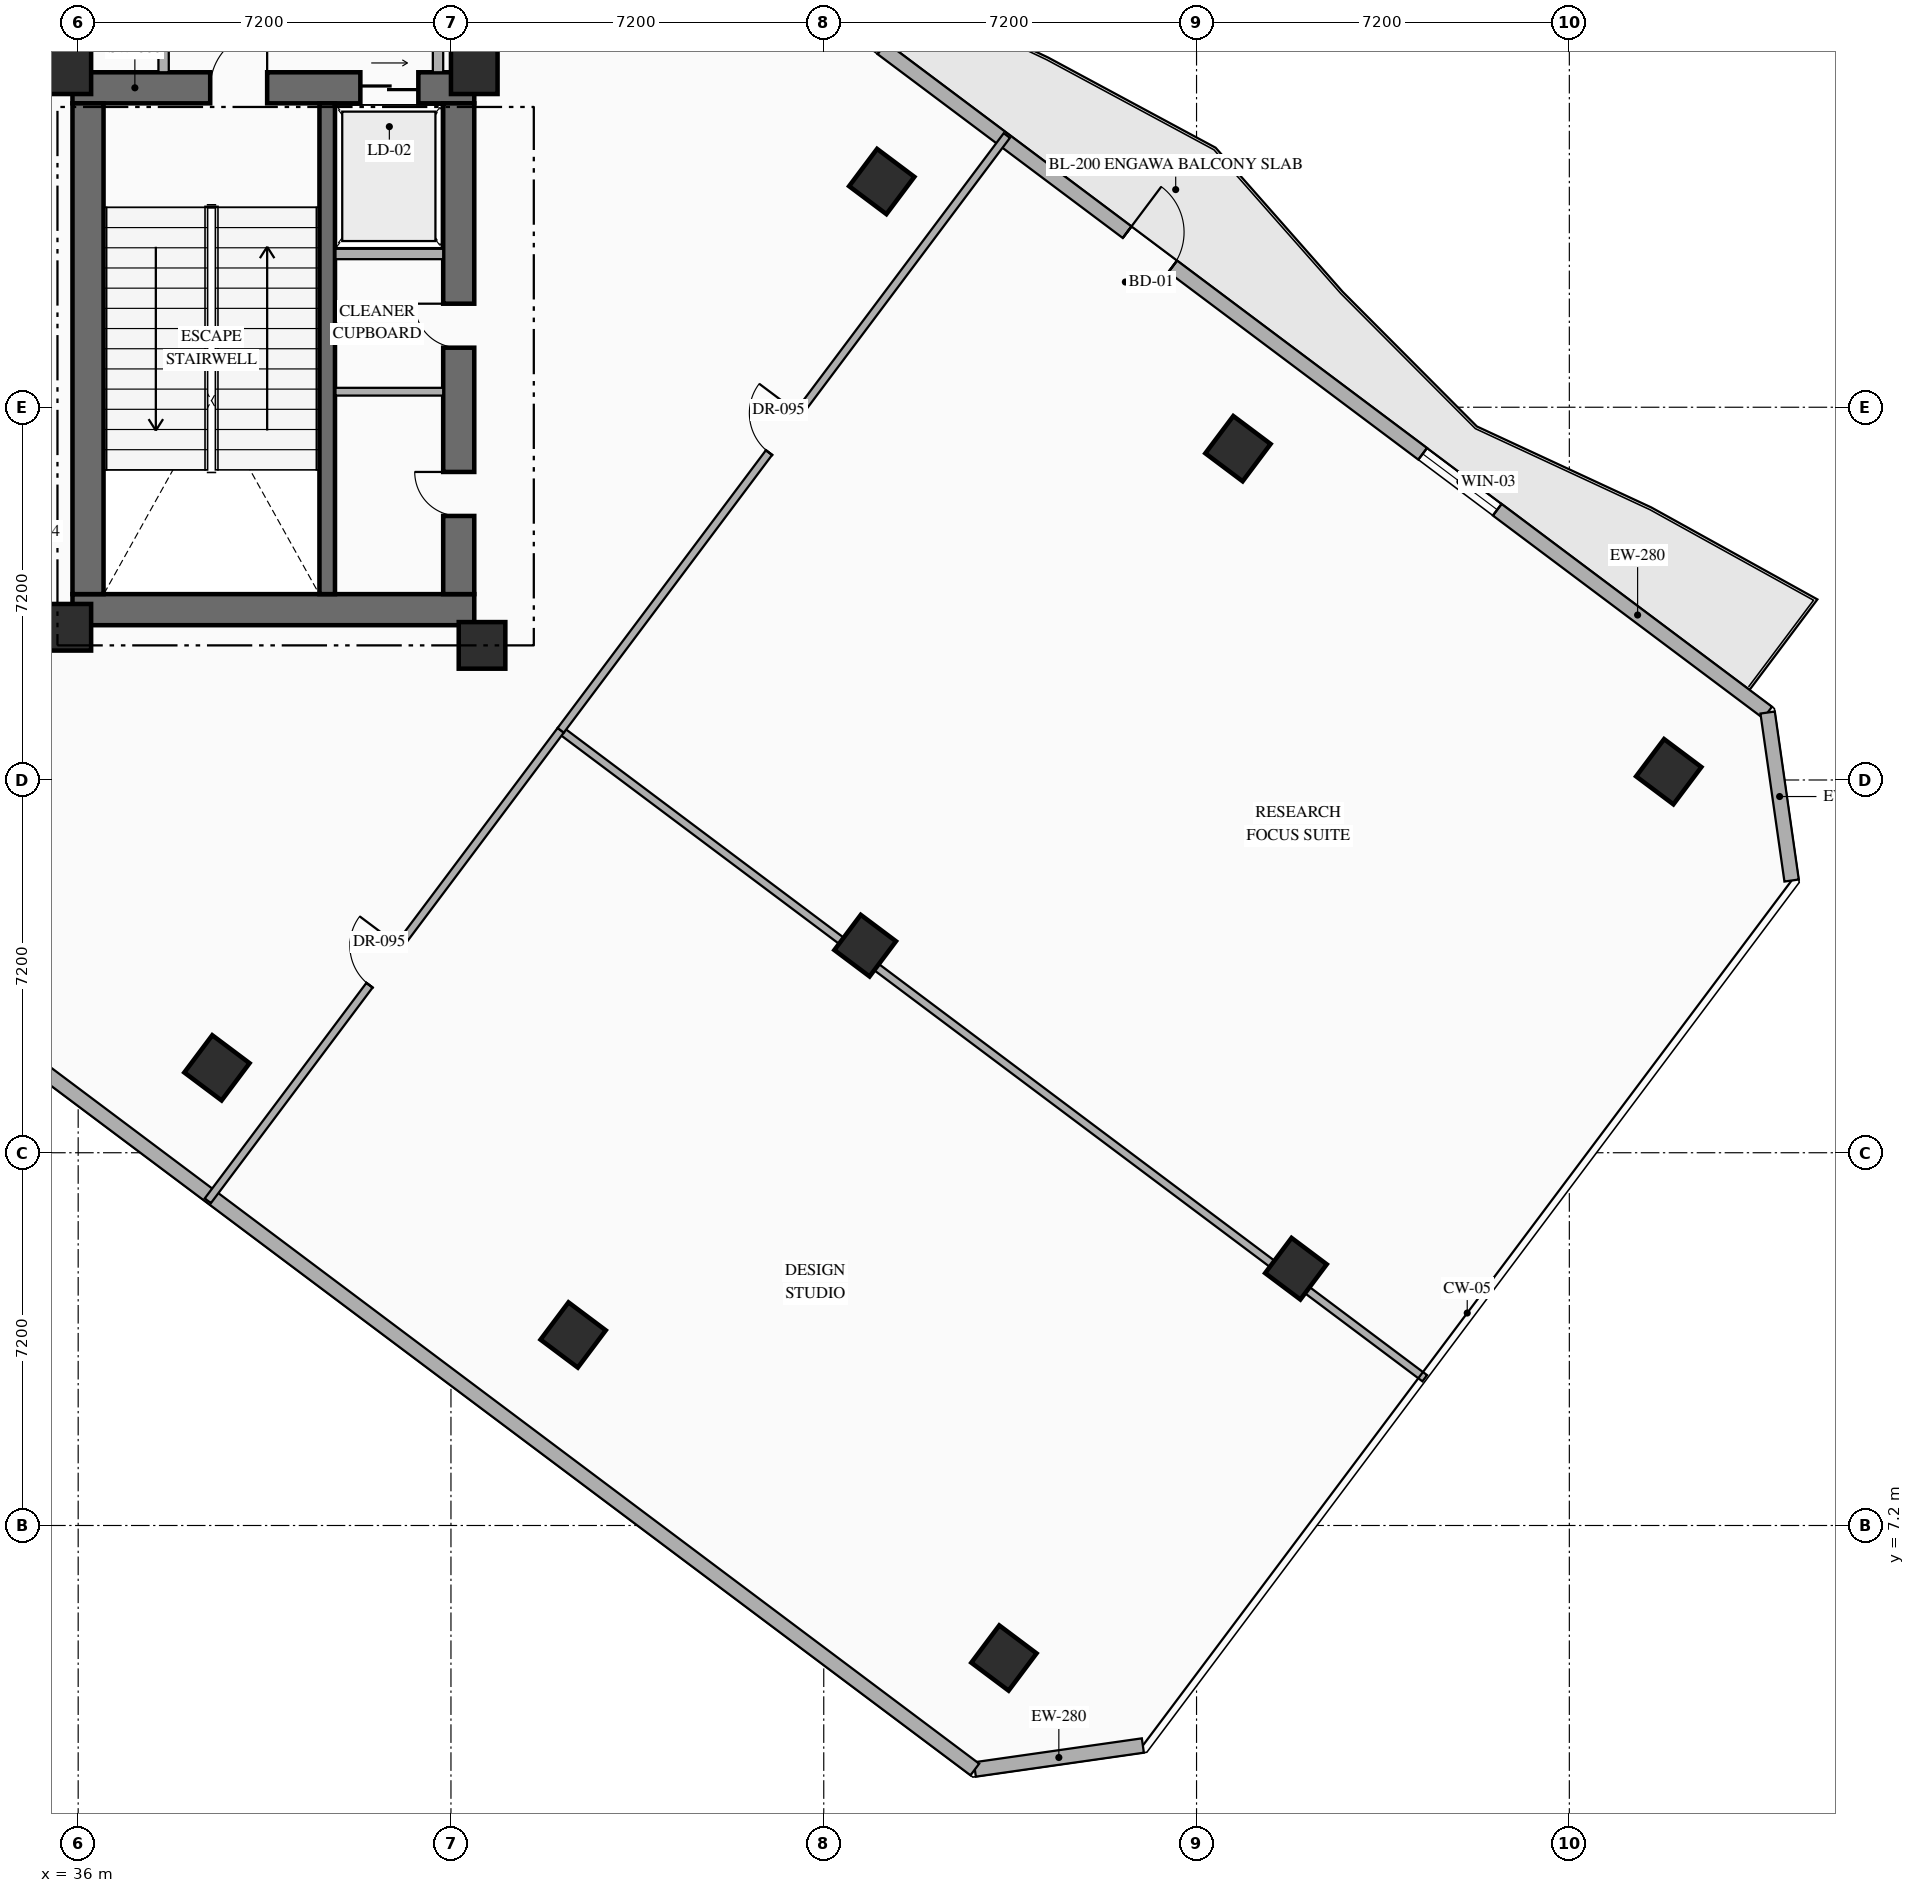
"""IFC4 building model, lengths in metres.
Left out: names, types, materials, properties, quantities, classifications, styles, units other than length and angle.
Written with IfcOpenShell. Run it as: python <this file> out.ifc"""

import sys

from ifc_helpers import new_model, si_unit, direction, frame, frame_2d, origin, origin_2d, place, context, subcontext, project, spatial, rectangle, hollow_rectangle, extrude, element, fill, save


model = new_model("IFC4")
c1 = context("Model", 3, precision=1e-05, world=origin(), true_north=direction((0.0, 1.0)))
c2 = subcontext(c1, "Body", "Model", "MODEL_VIEW")
j1 = project(units=[si_unit("LENGTHUNIT", "METRE"), si_unit("PLANEANGLEUNIT", "RADIAN")], contexts=[c1])
p1 = place(None, origin())
s1 = spatial("IfcSite", under=j1, at=p1, CompositionType="ELEMENT")
p2 = place(p1, origin())
s2 = spatial("IfcBuilding", under=s1, at=p2, CompositionType="ELEMENT")
p3 = place(p2, frame((0.0, 0.0, 96.45)))
s3 = spatial("IfcBuildingStorey", under=s2, at=p3, CompositionType="ELEMENT", Elevation=96.45)
p4 = place(p3, frame((35.89, 24.89, 0.0), z_axis=(0.0, 0.0, 1.0), x_axis=(1.0, 0.0, 0.0)))
e1 = element("IfcWall", 1, at=p4, inside=s3, PredefinedType="SHEAR", context=c2, shape_type="SweptSolid", body=[
    extrude(rectangle(XDim=7.76, YDim=0.6, at=frame_2d((3.88, 0.0))), origin(), (0.0, 0.0, 1.0), 4.8),
])
p5 = place(p3, frame((35.89, 34.97, 0.0), z_axis=(0.0, 0.0, 1.0), x_axis=(1.0, 0.0, 0.0)))
e2 = element("IfcWall", 2, at=p5, inside=s3, PredefinedType="SHEAR", context=c2, shape_type="SweptSolid", body=[
    extrude(rectangle(XDim=7.76, YDim=0.6, at=frame_2d((3.88, 0.0))), origin(), (0.0, 0.0, 1.0), 4.8),
])
p6 = place(p5, frame((2.66, 0.0, 0.0)))
e3 = element("IfcOpeningElement", 3, at=p6, cuts=e2, PredefinedType="OPENING", context=c2, shape_type="SweptSolid", body=[
    extrude(rectangle(XDim=1.1, YDim=2.2, at=frame_2d((0.55, 1.1))), frame((0.0, 0.31, 0.0), z_axis=(0.0, -1.0, 0.0), x_axis=(1.0, 0.0, 0.0)), (0.0, 0.0, 1.0), 0.62),
])
p7 = place(p5, frame((5.56, 0.0, 0.0)))
e4 = element("IfcOpeningElement", 4, at=p7, cuts=e2, PredefinedType="OPENING", context=c2, shape_type="SweptSolid", body=[
    extrude(rectangle(XDim=1.12, YDim=2.15, at=frame_2d((0.56, 1.075))), frame((0.0, 0.31, 0.0), z_axis=(0.0, -1.0, 0.0), x_axis=(1.0, 0.0, 0.0)), (0.0, 0.0, 1.0), 0.62),
])
p8 = place(p3, frame((36.19, 25.19, 0.0), z_axis=(0.0, 0.0, 1.0), x_axis=(0.0, 1.0, 0.0)))
e5 = element("IfcWall", 5, at=p8, inside=s3, PredefinedType="SHEAR", context=c2, shape_type="SweptSolid", body=[
    extrude(rectangle(XDim=9.48, YDim=0.6, at=frame_2d((4.74, 0.0))), origin(), (0.0, 0.0, 1.0), 4.8),
])
p9 = place(p3, frame((43.35, 25.19, 0.0), z_axis=(0.0, 0.0, 1.0), x_axis=(0.0, 1.0, 0.0)))
e6 = element("IfcWall", 6, at=p9, inside=s3, PredefinedType="SHEAR", context=c2, shape_type="SweptSolid", body=[
    extrude(rectangle(XDim=9.48, YDim=0.6, at=frame_2d((4.74, 0.0))), origin(), (0.0, 0.0, 1.0), 4.8),
])
p10 = place(p9, frame((1.51, 0.0, 0.0)))
e7 = element("IfcOpeningElement", 7, at=p10, cuts=e6, PredefinedType="OPENING", context=c2, shape_type="SweptSolid", body=[
    extrude(rectangle(XDim=0.85, YDim=2.08, at=frame_2d((0.425, 1.04))), frame((0.0, 0.31, 0.0), z_axis=(0.0, -1.0, 0.0), x_axis=(1.0, 0.0, 0.0)), (0.0, 0.0, 1.0), 0.62),
])
p11 = place(p9, frame((4.76, 0.0, 0.0)))
e8 = element("IfcOpeningElement", 8, at=p11, cuts=e6, PredefinedType="OPENING", context=c2, shape_type="SweptSolid", body=[
    extrude(rectangle(XDim=0.85, YDim=2.08, at=frame_2d((0.425, 1.04))), frame((0.0, 0.31, 0.0), z_axis=(0.0, -1.0, 0.0), x_axis=(1.0, 0.0, 0.0)), (0.0, 0.0, 1.0), 0.62),
])
p12 = place(p3, frame((40.81, 25.19, 0.0), z_axis=(0.0, 0.0, 1.0), x_axis=(0.0, 1.0, 0.0)))
e9 = element("IfcWall", 9, at=p12, inside=s3, PredefinedType="SHEAR", context=c2, shape_type="SweptSolid", body=[
    extrude(rectangle(XDim=9.48, YDim=0.3, at=frame_2d((4.74, 0.0))), origin(), (0.0, 0.0, 1.0), 4.8),
])
for number, where, z_axis, x_axis in (
    (10, (35.8, 24.55, 0.0), (0.0, 0.0, 1.0), (1.0, 0.0, 0.0)),
    (11, (43.8, 24.2, 0.0), (0.0, 0.0, 1.0), (1.0, 0.0, 0.0)),
    (12, (35.8, 35.3, 0.0), (0.0, 0.0, 1.0), (1.0, 0.0, 0.0)),
    (13, (43.65, 35.3, 0.0), (0.0, 0.0, 1.0), (1.0, 0.0, 0.0)),
):
    element("IfcColumn", number, at=place(p3, frame(where, z_axis=z_axis, x_axis=x_axis)), inside=s3, PredefinedType="COLUMN", context=c2, shape_type="SweptSolid", body=[
        extrude(rectangle(XDim=0.9, YDim=0.9, at=origin_2d()), origin(), (0.0, 0.0, 1.0), 4.8),
    ])
for number, where, z_axis, x_axis in (
    (14, (38.68, 16.04, 0.0), (0.0, 0.0, 1.0), (0.8, -0.6, 0.0)),
    (15, (51.52, 33.16, 0.0), (0.0, 0.0, 1.0), (0.8, -0.6, 0.0)),
    (16, (45.56, 10.88, 0.0), (0.0, 0.0, 1.0), (0.8, -0.6, 0.0)),
    (17, (58.4, 28.0, 0.0), (0.0, 0.0, 1.0), (0.8, -0.6, 0.0)),
):
    element("IfcColumn", number, at=place(p3, frame(where, z_axis=z_axis, x_axis=x_axis)), inside=s3, PredefinedType="COLUMN", context=c2, shape_type="SweptSolid", body=[
        extrude(hollow_rectangle(XDim=0.9, YDim=0.9, WallThickness=0.036, at=origin_2d()), origin(), (0.0, 0.0, 1.0), 4.8),
    ])
p13 = place(p3, frame((51.2, 18.4, 0.0), z_axis=(0.0, 0.0, 1.0), x_axis=(0.799999996291, -0.600000004945, 0.0)))
e18 = element("IfcColumn", 18, at=p13, inside=s3, PredefinedType="COLUMN", context=c2, shape_type="SweptSolid", body=[
    extrude(hollow_rectangle(XDim=0.85, YDim=0.85, WallThickness=0.032, at=origin_2d()), origin(), (0.0, 0.0, 1.0), 4.8),
])
for number, where, z_axis, x_axis in (
    (19, (53.88, 4.64, 0.0), (0.0, 0.0, 1.0), (0.8, -0.6, 0.0)),
    (20, (66.72, 21.76, 0.0), (0.0, 0.0, 1.0), (0.8, -0.6, 0.0)),
):
    element("IfcColumn", number, at=place(p3, frame(where, z_axis=z_axis, x_axis=x_axis)), inside=s3, PredefinedType="COLUMN", context=c2, shape_type="SweptSolid", body=[
        extrude(hollow_rectangle(XDim=0.9, YDim=0.9, WallThickness=0.036, at=origin_2d()), origin(), (0.0, 0.0, 1.0), 4.8),
    ])
p14 = place(p3, frame((59.52, 12.16, 0.0), z_axis=(0.0, 0.0, 1.0), x_axis=(0.799999996291, -0.600000004945, 0.0)))
e21 = element("IfcColumn", 21, at=p14, inside=s3, PredefinedType="COLUMN", context=c2, shape_type="SweptSolid", body=[
    extrude(hollow_rectangle(XDim=0.85, YDim=0.85, WallThickness=0.032, at=origin_2d()), origin(), (0.0, 0.0, 1.0), 4.8),
])
p15 = place(p3, frame((44.86, 40.73, 0.0), z_axis=(0.0, 0.0, 1.0), x_axis=(0.800006902154, -0.599990797017, 0.0)))
e22 = element("IfcWall", 22, at=p15, inside=s3, PredefinedType="STANDARD", context=c2, shape_type="SweptSolid", body=[
    extrude(rectangle(XDim=29.712, YDim=0.28, at=frame_2d((14.856, 0.0))), origin(), (0.0, 0.0, 1.0), 4.55),
])
p16 = place(p15, frame((14.249, 0.0, 0.0)))
e23 = element("IfcOpeningElement", 23, at=p16, cuts=e22, PredefinedType="OPENING", context=c2, shape_type="SweptSolid", body=[
    extrude(rectangle(XDim=1.1, YDim=2.2, at=frame_2d((0.55, 1.1))), frame((0.0, 0.15, 0.0), z_axis=(0.0, -1.0, 0.0), x_axis=(1.0, 0.0, 0.0)), (0.0, 0.0, 1.0), 0.3),
])
p17 = place(p15, frame((6.528, 0.0, 0.85)))
e24 = element("IfcOpeningElement", 24, at=p17, cuts=e22, PredefinedType="OPENING", context=c2, shape_type="SweptSolid", body=[
    extrude(rectangle(XDim=1.8, YDim=2.1, at=frame_2d((0.9, 1.05))), frame((0.0, 0.15, 0.0), z_axis=(0.0, -1.0, 0.0), x_axis=(1.0, 0.0, 0.0)), (0.0, 0.0, 1.0), 0.3),
])
p18 = place(p15, frame((21.384, 0.0, 0.85)))
e25 = element("IfcOpeningElement", 25, at=p18, cuts=e22, PredefinedType="OPENING", context=c2, shape_type="SweptSolid", body=[
    extrude(rectangle(XDim=1.8, YDim=2.1, at=frame_2d((0.9, 1.05))), frame((0.0, 0.15, 0.0), z_axis=(0.0, -1.0, 0.0), x_axis=(1.0, 0.0, 0.0)), (0.0, 0.0, 1.0), 0.3),
])
p19 = place(p3, frame((68.63, 22.903, 0.0), z_axis=(0.0, 0.0, 1.0), x_axis=(0.141285803956, -0.989968848803, 0.0)))
e26 = element("IfcWall", 26, at=p19, inside=s3, PredefinedType="STANDARD", context=c2, shape_type="SweptSolid", body=[
    extrude(rectangle(XDim=3.278, YDim=0.28, at=frame_2d((1.639, 0.0))), origin(), (0.0, 0.0, 1.0), 4.55),
])
p20 = place(p3, frame((56.563, 2.95, 0.0), z_axis=(0.0, 0.0, 1.0), x_axis=(-0.989977778067, -0.141223223777, 0.0)))
e27 = element("IfcWall", 27, at=p20, inside=s3, PredefinedType="STANDARD", context=c2, shape_type="SweptSolid", body=[
    extrude(rectangle(XDim=3.278, YDim=0.28, at=frame_2d((1.639, 0.0))), origin(), (0.0, 0.0, 1.0), 4.55),
])
p21 = place(p3, frame((53.318, 2.487, 0.0), z_axis=(0.0, 0.0, 1.0), x_axis=(-0.800004174678, 0.599994433723, 0.0)))
e28 = element("IfcWall", 28, at=p21, inside=s3, PredefinedType="STANDARD", context=c2, shape_type="SweptSolid", body=[
    extrude(rectangle(XDim=35.089, YDim=0.28, at=frame_2d((17.544, 0.0))), origin(), (0.0, 0.0, 1.0), 4.55),
])
p22 = place(p3, frame((40.97, 31.76, 0.0), z_axis=(0.0, 0.0, 1.0), x_axis=(1.0, 0.0, 0.0)))
e29 = element("IfcWall", 29, at=p22, inside=s3, PredefinedType="STANDARD", context=c2, shape_type="SweptSolid", body=[
    extrude(rectangle(XDim=2.08, YDim=0.2, at=frame_2d((1.04, 0.0))), origin(), (0.0, 0.0, 1.0), 4.55),
])
p23 = place(p3, frame((40.97, 29.1, 0.0), z_axis=(0.0, 0.0, 1.0), x_axis=(1.0, 0.0, 0.0)))
e30 = element("IfcWall", 30, at=p23, inside=s3, PredefinedType="PARTITIONING", context=c2, shape_type="SweptSolid", body=[
    extrude(rectangle(XDim=2.08, YDim=0.15, at=frame_2d((1.04, 0.0))), origin(), (0.0, 0.0, 1.0), 4.55),
])
p24 = place(p3, frame((42.95, 35.27, 0.0), z_axis=(0.0, 0.0, 1.0), x_axis=(0.0, 1.0, 0.0)))
e31 = element("IfcWall", 31, at=p24, inside=s3, PredefinedType="STANDARD", context=c2, shape_type="SweptSolid", body=[
    extrude(rectangle(XDim=2.83, YDim=0.2, at=frame_2d((1.415, 0.0))), origin(), (0.0, 0.0, 1.0), 4.55),
])
p25 = place(p3, frame((37.65, 35.27, 0.0), z_axis=(0.0, 0.0, 1.0), x_axis=(0.0, 1.0, 0.0)))
e32 = element("IfcWall", 32, at=p25, inside=s3, PredefinedType="STANDARD", context=c2, shape_type="SweptSolid", body=[
    extrude(rectangle(XDim=2.83, YDim=0.2, at=frame_2d((1.415, 0.0))), origin(), (0.0, 0.0, 1.0), 4.55),
])
p26 = place(p25, frame((0.915, 0.0, 0.0)))
e33 = element("IfcOpeningElement", 33, at=p26, cuts=e32, PredefinedType="OPENING", context=c2, shape_type="SweptSolid", body=[
    extrude(rectangle(XDim=1.0, YDim=2.2, at=frame_2d((0.5, 1.1))), frame((0.0, 0.11, 0.0), z_axis=(0.0, -1.0, 0.0), x_axis=(1.0, 0.0, 0.0)), (0.0, 0.0, 1.0), 0.22),
])
p27 = place(p3, frame((45.32, 22.56, 0.0), z_axis=(0.0, 0.0, 1.0), x_axis=(0.799997191095, -0.600003745189, 0.0)))
e34 = element("IfcWall", 34, at=p27, inside=s3, PredefinedType="PARTITIONING", context=c2, shape_type="SweptSolid", body=[
    extrude(rectangle(XDim=20.86, YDim=0.15, at=frame_2d((10.43, 0.0))), origin(), (0.0, 0.0, 1.0), 3.745),
])
p28 = place(p3, frame((38.504, 13.472, 0.0), z_axis=(0.0, 0.0, 1.0), x_axis=(0.600003438533, 0.799997421089, 0.0)))
e35 = element("IfcWall", 35, at=p28, inside=s3, PredefinedType="PARTITIONING", context=c2, shape_type="SweptSolid", body=[
    extrude(rectangle(XDim=11.36, YDim=0.15, at=frame_2d((5.68, 0.0))), origin(), (0.0, 0.0, 1.0), 4.55),
])
p29 = place(p28, frame((5.205, 0.0, 0.0)))
e36 = element("IfcOpeningElement", 36, at=p29, cuts=e35, PredefinedType="OPENING", context=c2, shape_type="SweptSolid", body=[
    extrude(rectangle(XDim=0.95, YDim=2.15, at=frame_2d((0.475, 1.075))), frame((0.0, 0.085, 0.0), z_axis=(0.0, -1.0, 0.0), x_axis=(1.0, 0.0, 0.0)), (0.0, 0.0, 1.0), 0.17),
])
p30 = place(p3, frame((45.32, 22.56, 0.0), z_axis=(0.0, 0.0, 1.0), x_axis=(0.599997279769, 0.800002040166, 0.0)))
e37 = element("IfcWall", 37, at=p30, inside=s3, PredefinedType="PARTITIONING", context=c2, shape_type="SweptSolid", body=[
    extrude(rectangle(XDim=14.36, YDim=0.15, at=frame_2d((7.18, 0.0))), origin(), (0.0, 0.0, 1.0), 4.55),
])
p31 = place(p30, frame((6.705, 0.0, 0.0)))
e38 = element("IfcOpeningElement", 38, at=p31, cuts=e37, PredefinedType="OPENING", context=c2, shape_type="SweptSolid", body=[
    extrude(rectangle(XDim=0.95, YDim=2.15, at=frame_2d((0.475, 1.075))), frame((0.0, 0.085, 0.0), z_axis=(0.0, -1.0, 0.0), x_axis=(1.0, 0.0, 0.0)), (0.0, 0.0, 1.0), 0.17),
])
p32 = place(p16, origin())
e39 = element("IfcDoor", 39, at=p32, inside=s3, OperationType="SINGLE_SWING_LEFT", PredefinedType="DOOR", context=c2, shape_type="SweptSolid", body=[
    extrude(rectangle(XDim=1.1, YDim=2.2, at=frame_2d((0.55, 1.1))), frame((0.0, 0.025, 0.0), z_axis=(0.0, -1.0, 0.0), x_axis=(1.0, 0.0, 0.0)), (0.0, 0.0, 1.0), 0.05),
])
fill(e23, e39)
p33 = place(p18, origin())
e40 = element("IfcWindow", 40, at=p33, inside=s3, PartitioningType="SINGLE_PANEL", PredefinedType="WINDOW", context=c2, shape_type="SweptSolid", body=[
    extrude(rectangle(XDim=1.8, YDim=2.1, at=frame_2d((0.9, 1.05))), frame((0.0, 0.03, 0.0), z_axis=(0.0, -1.0, 0.0), x_axis=(1.0, 0.0, 0.0)), (0.0, 0.0, 1.0), 0.06),
])
fill(e25, e40)
p34 = place(p6, origin())
e41 = element("IfcDoor", 41, at=p34, inside=s3, OperationType="SINGLE_SWING_RIGHT", PredefinedType="DOOR", context=c2, shape_type="SweptSolid", body=[
    extrude(rectangle(XDim=1.1, YDim=2.2, at=frame_2d((0.55, 1.1))), frame((0.0, 0.025, 0.0), z_axis=(0.0, -1.0, 0.0), x_axis=(1.0, 0.0, 0.0)), (0.0, 0.0, 1.0), 0.05),
])
fill(e3, e41)
p35 = place(p7, origin())
e42 = element("IfcDoor", 42, at=p35, inside=s3, OperationType="SLIDING_TO_RIGHT", PredefinedType="USERDEFINED", context=c2, shape_type="SweptSolid", body=[
    extrude(rectangle(XDim=1.12, YDim=2.15, at=frame_2d((0.56, 1.075))), frame((0.0, 0.025, 0.0), z_axis=(0.0, -1.0, 0.0), x_axis=(1.0, 0.0, 0.0)), (0.0, 0.0, 1.0), 0.05),
])
fill(e4, e42)
p36 = place(p10, origin())
e43 = element("IfcDoor", 43, at=p36, inside=s3, OperationType="SINGLE_SWING_RIGHT", PredefinedType="DOOR", context=c2, shape_type="SweptSolid", body=[
    extrude(rectangle(XDim=0.85, YDim=2.08, at=frame_2d((0.425, 1.04))), frame((0.0, 0.025, 0.0), z_axis=(0.0, -1.0, 0.0), x_axis=(1.0, 0.0, 0.0)), (0.0, 0.0, 1.0), 0.05),
])
fill(e7, e43)
p37 = place(p11, origin())
e44 = element("IfcDoor", 44, at=p37, inside=s3, OperationType="SINGLE_SWING_RIGHT", PredefinedType="DOOR", context=c2, shape_type="SweptSolid", body=[
    extrude(rectangle(XDim=0.85, YDim=2.08, at=frame_2d((0.425, 1.04))), frame((0.0, 0.025, 0.0), z_axis=(0.0, -1.0, 0.0), x_axis=(1.0, 0.0, 0.0)), (0.0, 0.0, 1.0), 0.05),
])
fill(e8, e44)
p38 = place(p29, origin())
e45 = element("IfcDoor", 45, at=p38, inside=s3, OperationType="SINGLE_SWING_RIGHT", PredefinedType="DOOR", context=c2, shape_type="SweptSolid", body=[
    extrude(rectangle(XDim=0.95, YDim=2.15, at=frame_2d((0.475, 1.075))), frame((0.0, 0.025, 0.0), z_axis=(0.0, -1.0, 0.0), x_axis=(1.0, 0.0, 0.0)), (0.0, 0.0, 1.0), 0.05),
])
fill(e36, e45)
p39 = place(p31, origin())
e46 = element("IfcDoor", 46, at=p39, inside=s3, OperationType="SINGLE_SWING_RIGHT", PredefinedType="DOOR", context=c2, shape_type="SweptSolid", body=[
    extrude(rectangle(XDim=0.95, YDim=2.15, at=frame_2d((0.475, 1.075))), frame((0.0, 0.025, 0.0), z_axis=(0.0, -1.0, 0.0), x_axis=(1.0, 0.0, 0.0)), (0.0, 0.0, 1.0), 0.05),
])
fill(e38, e46)
save(model, sys.argv[1])
